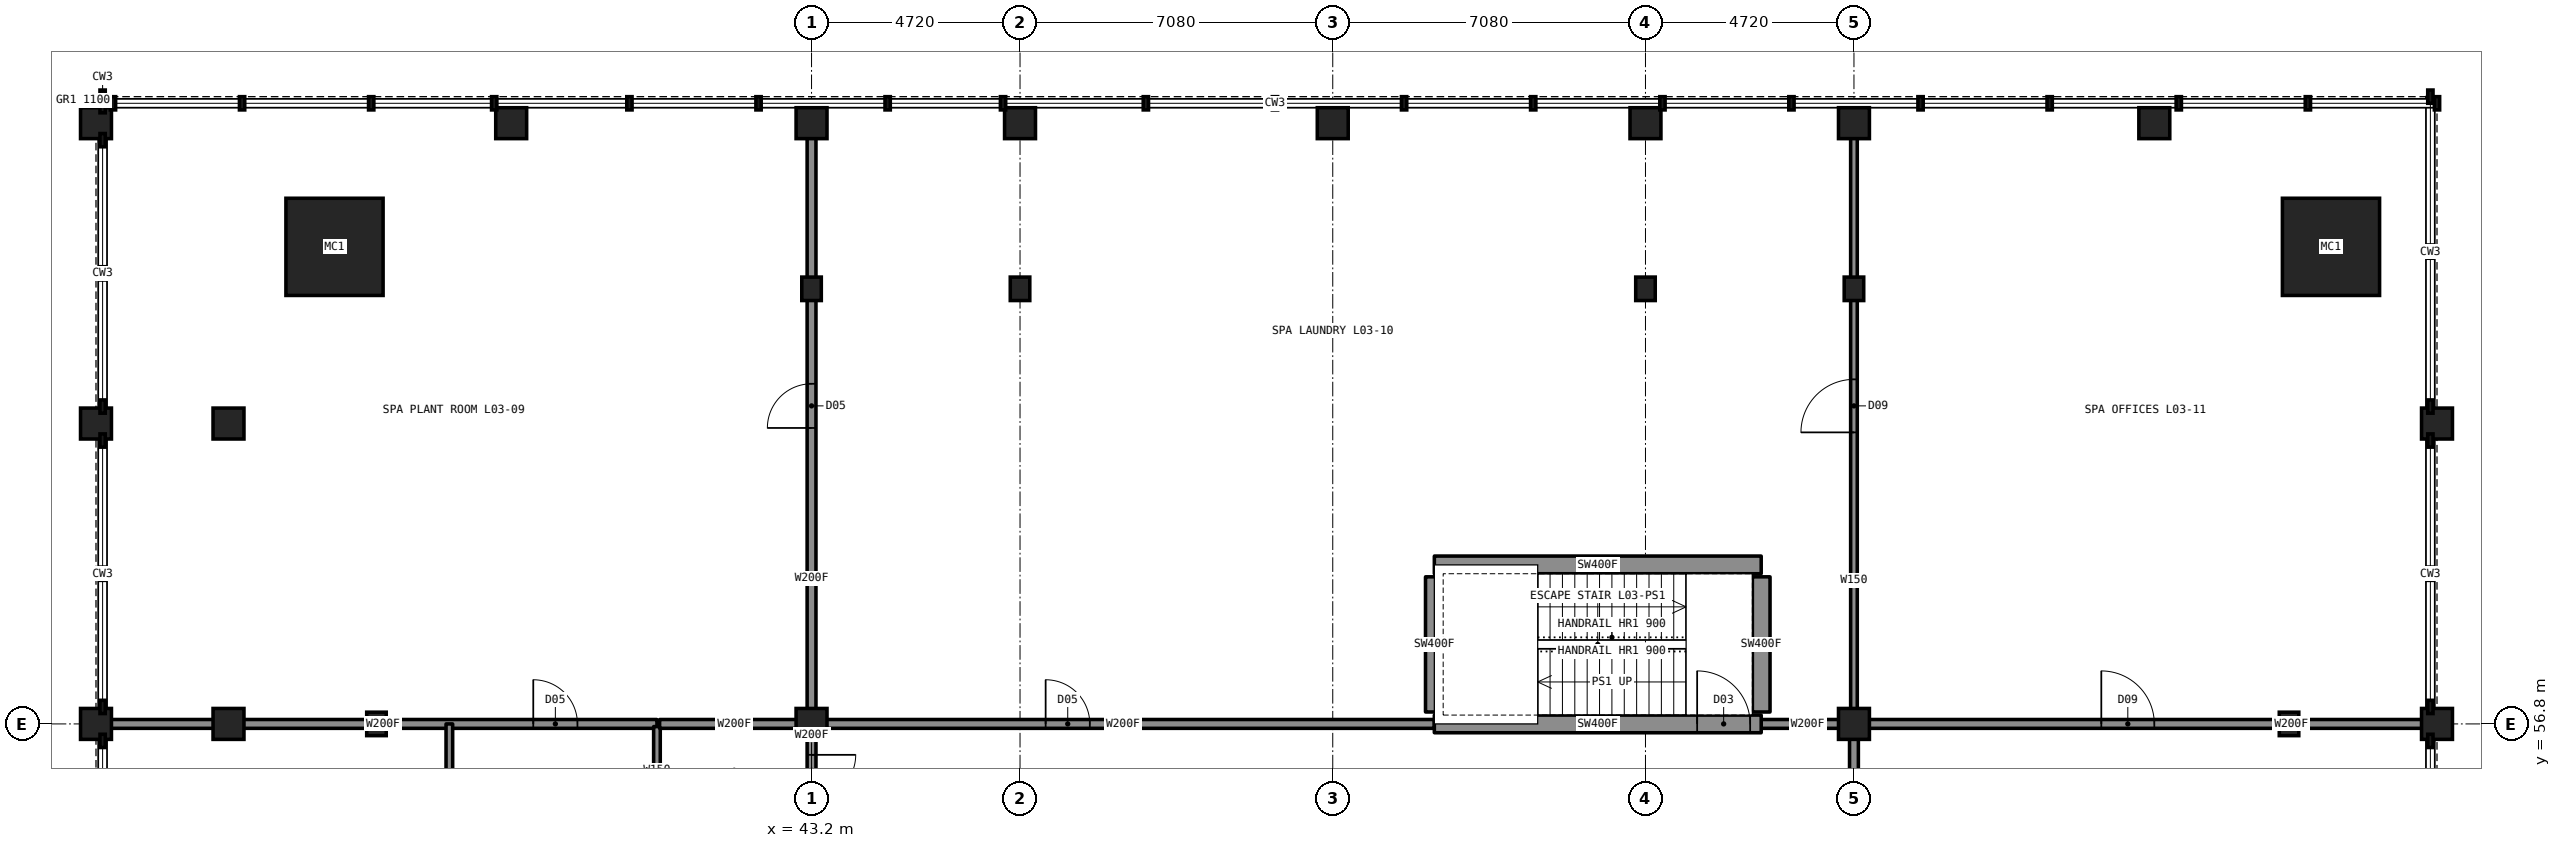
"""IFC4 building model, lengths in metres.
Left out: names, types, materials, properties, quantities, classifications, styles, units other than length and angle.
Written with IfcOpenShell. Run it as: python <this file> out.ifc"""

import sys

from ifc_helpers import new_model, si_unit, direction, frame, frame_2d, origin, origin_2d, place, context, subcontext, project, spatial, rectangle, hollow_rectangle, i_section, extrude, element, fill, save


model = new_model("IFC4")
c1 = context("Model", 3, precision=1e-05, world=origin(), true_north=direction((0.0, 1.0)))
c2 = subcontext(c1, "Body", "Model", "MODEL_VIEW")
j1 = project(units=[si_unit("LENGTHUNIT", "METRE"), si_unit("PLANEANGLEUNIT", "RADIAN")], contexts=[c1])
p1 = place(None, origin())
s1 = spatial("IfcSite", under=j1, at=p1, CompositionType="ELEMENT")
p2 = place(p1, origin())
s2 = spatial("IfcBuilding", under=s1, at=p2, CompositionType="ELEMENT")
p3 = place(p2, frame((0.0, 0.0, 16.0)))
s3 = spatial("IfcBuildingStorey", under=s2, at=p3, CompositionType="ELEMENT", Elevation=16.0)
for number, where, z_axis, x_axis in (
    (1, (33.35, 56.8, 0.0), (0.0, 0.0, 1.0), (1.0, 0.0, 0.0)),
    (2, (43.2, 66.65, 0.0), (0.0, 0.0, 1.0), (1.0, 0.0, 0.0)),
    (3, (47.92, 66.65, 0.0), (0.0, 0.0, 1.0), (1.0, 0.0, 0.0)),
    (4, (62.08, 66.65, 0.0), (0.0, 0.0, 1.0), (1.0, 0.0, 0.0)),
    (5, (66.8, 66.65, 0.0), (0.0, 0.0, 1.0), (1.0, 0.0, 0.0)),
    (6, (76.65, 56.8, 0.0), (0.0, 0.0, 1.0), (1.0, 0.0, 0.0)),
):
    element("IfcColumn", number, at=place(p3, frame(where, z_axis=z_axis, x_axis=x_axis)), inside=s3, PredefinedType="COLUMN", context=c2, shape_type="SweptSolid", body=[
        extrude(i_section(OverallWidth=0.442, OverallDepth=0.531, WebThickness=0.066, FlangeThickness=0.106, at=origin_2d()), origin(), (0.0, 0.0, 1.0), 4.5),
    ])
for number, where, z_axis, x_axis in (
    (7, (43.2, 56.8, 0.0), (0.0, 0.0, 1.0), (1.0, 0.0, 0.0)),
    (8, (66.8, 56.8, 0.0), (0.0, 0.0, 1.0), (1.0, 0.0, 0.0)),
):
    element("IfcColumn", number, at=place(p3, frame(where, z_axis=z_axis, x_axis=x_axis)), inside=s3, PredefinedType="COLUMN", context=c2, shape_type="SweptSolid", body=[
        extrude(hollow_rectangle(XDim=0.7, YDim=0.7, WallThickness=0.06, at=origin_2d()), origin(), (0.0, 0.0, 1.0), 4.5),
    ])
for number, where, z_axis, x_axis in (
    (9, (77.6, 67.6, 0.0), (0.0, 0.0, 1.0), (1.0, 0.0, 0.0)),
    (10, (32.4, 67.6, 0.0), (0.0, 0.0, 1.0), (1.0, 0.0, 0.0)),
):
    element("IfcColumn", number, at=place(p3, frame(where, z_axis=z_axis, x_axis=x_axis)), inside=s3, PredefinedType="COLUMN", context=c2, shape_type="SweptSolid", body=[
        extrude(hollow_rectangle(XDim=2.2, YDim=2.2, WallThickness=0.15, at=origin_2d()), origin(), (0.0, 0.0, 1.0), 4.5),
    ])
for number, where, z_axis, x_axis in (
    (11, (27.0, 56.8, 0.0), (0.0, 0.0, 1.0), (1.0, 0.0, 0.0)),
    (12, (27.0, 63.6, 0.0), (0.0, 0.0, 1.0), (1.0, 0.0, 0.0)),
    (13, (27.0, 70.4, 0.0), (0.0, 0.0, 1.0), (1.0, 0.0, 0.0)),
    (14, (30.0, 56.8, 0.0), (0.0, 0.0, 1.0), (1.0, 0.0, 0.0)),
    (15, (30.0, 63.6, 0.0), (0.0, 0.0, 1.0), (1.0, 0.0, 0.0)),
    (16, (36.4, 70.4, 0.0), (0.0, 0.0, 1.0), (1.0, 0.0, 0.0)),
    (17, (43.2, 70.4, 0.0), (0.0, 0.0, 1.0), (1.0, 0.0, 0.0)),
    (18, (47.92, 70.4, 0.0), (0.0, 0.0, 1.0), (1.0, 0.0, 0.0)),
    (19, (55.0, 70.4, 0.0), (0.0, 0.0, 1.0), (1.0, 0.0, 0.0)),
    (20, (62.08, 70.4, 0.0), (0.0, 0.0, 1.0), (1.0, 0.0, 0.0)),
    (21, (66.8, 70.4, 0.0), (0.0, 0.0, 1.0), (1.0, 0.0, 0.0)),
    (22, (73.6, 70.4, 0.0), (0.0, 0.0, 1.0), (1.0, 0.0, 0.0)),
    (23, (80.0, 56.8, 0.0), (0.0, 0.0, 1.0), (1.0, 0.0, 0.0)),
    (24, (80.0, 63.6, 0.0), (0.0, 0.0, 1.0), (1.0, 0.0, 0.0)),
):
    element("IfcColumn", number, at=place(p3, frame(where, z_axis=z_axis, x_axis=x_axis)), inside=s3, PredefinedType="COLUMN", context=c2, shape_type="SweptSolid", body=[
        extrude(rectangle(XDim=0.7, YDim=0.7, at=origin_2d()), origin(), (0.0, 0.0, 1.0), 4.5),
    ])
p4 = place(p3, frame((43.2, 56.8, 0.0), z_axis=(0.0, 0.0, 1.0), x_axis=(1.0, 0.0, 0.0)))
e25 = element("IfcWall", 25, at=p4, inside=s3, PredefinedType="PARTITIONING", context=c2, shape_type="SweptSolid", body=[
    extrude(rectangle(XDim=14.1, YDim=0.2, at=frame_2d((7.05, 0.0))), origin(), (0.0, 0.0, 1.0), 4.15),
])
p5 = place(p4, frame((5.3, 0.0, 0.0)))
e26 = element("IfcOpeningElement", 26, at=p5, cuts=e25, PredefinedType="OPENING", context=c2, shape_type="SweptSolid", body=[
    extrude(rectangle(XDim=1.0, YDim=2.1, at=frame_2d((0.5, 1.05))), frame((0.0, 0.11, 0.0), z_axis=(0.0, -1.0, 0.0), x_axis=(1.0, 0.0, 0.0)), (0.0, 0.0, 1.0), 0.22),
])
p6 = place(p3, frame((64.7, 56.8, 0.0), z_axis=(0.0, 0.0, 1.0), x_axis=(1.0, 0.0, 0.0)))
e27 = element("IfcWall", 27, at=p6, inside=s3, PredefinedType="PARTITIONING", context=c2, shape_type="SweptSolid", body=[
    extrude(rectangle(XDim=2.1, YDim=0.2, at=frame_2d((1.05, 0.0))), origin(), (0.0, 0.0, 1.0), 4.15),
])
p7 = place(p3, frame((27.3, 56.8, 0.0), z_axis=(0.0, 0.0, 1.0), x_axis=(1.0, 0.0, 0.0)))
e28 = element("IfcWall", 28, at=p7, inside=s3, PredefinedType="PARTITIONING", context=c2, shape_type="SweptSolid", body=[
    extrude(rectangle(XDim=12.4, YDim=0.2, at=frame_2d((6.2, 0.0))), origin(), (0.0, 0.0, 1.0), 4.15),
])
p8 = place(p7, frame((9.6, 0.0, 0.0)))
e29 = element("IfcOpeningElement", 29, at=p8, cuts=e28, PredefinedType="OPENING", context=c2, shape_type="SweptSolid", body=[
    extrude(rectangle(XDim=1.0, YDim=2.1, at=frame_2d((0.5, 1.05))), frame((0.0, 0.11, 0.0), z_axis=(0.0, -1.0, 0.0), x_axis=(1.0, 0.0, 0.0)), (0.0, 0.0, 1.0), 0.22),
])
p9 = place(p3, frame((66.8, 56.8, 0.0), z_axis=(0.0, 0.0, 1.0), x_axis=(1.0, 0.0, 0.0)))
e30 = element("IfcWall", 30, at=p9, inside=s3, PredefinedType="PARTITIONING", context=c2, shape_type="SweptSolid", body=[
    extrude(rectangle(XDim=12.9, YDim=0.2, at=frame_2d((6.45, 0.0))), origin(), (0.0, 0.0, 1.0), 4.15),
])
p10 = place(p9, frame((5.6, 0.0, 0.0)))
e31 = element("IfcOpeningElement", 31, at=p10, cuts=e30, PredefinedType="OPENING", context=c2, shape_type="SweptSolid", body=[
    extrude(rectangle(XDim=1.2, YDim=2.2, at=frame_2d((0.6, 1.1))), frame((0.0, 0.11, 0.0), z_axis=(0.0, -1.0, 0.0), x_axis=(1.0, 0.0, 0.0)), (0.0, 0.0, 1.0), 0.22),
])
p11 = place(p3, frame((57.3, 56.8, 0.0), z_axis=(0.0, 0.0, 1.0), x_axis=(1.0, 0.0, 0.0)))
e32 = element("IfcWall", 32, at=p11, inside=s3, PredefinedType="SHEAR", context=c2, shape_type="SweptSolid", body=[
    extrude(rectangle(XDim=7.4, YDim=0.4, at=frame_2d((3.7, 0.0))), origin(), (0.0, 0.0, 1.0), 4.5),
])
p12 = place(p11, frame((5.95, 0.0, 0.0)))
e33 = element("IfcOpeningElement", 33, at=p12, cuts=e32, PredefinedType="OPENING", context=c2, shape_type="SweptSolid", body=[
    extrude(rectangle(XDim=1.2, YDim=2.2, at=frame_2d((0.6, 1.1))), frame((0.0, 0.21, 0.0), z_axis=(0.0, -1.0, 0.0), x_axis=(1.0, 0.0, 0.0)), (0.0, 0.0, 1.0), 0.42),
])
p13 = place(p3, frame((57.3, 60.4, 0.0), z_axis=(0.0, 0.0, 1.0), x_axis=(1.0, 0.0, 0.0)))
e34 = element("IfcWall", 34, at=p13, inside=s3, PredefinedType="SHEAR", context=c2, shape_type="SweptSolid", body=[
    extrude(rectangle(XDim=7.4, YDim=0.4, at=frame_2d((3.7, 0.0))), origin(), (0.0, 0.0, 1.0), 4.5),
])
p14 = place(p3, frame((43.2, 56.8, 0.0), z_axis=(0.0, 0.0, 1.0), x_axis=(0.0, 1.0, 0.0)))
e35 = element("IfcWall", 35, at=p14, inside=s3, PredefinedType="PARTITIONING", context=c2, shape_type="SweptSolid", body=[
    extrude(rectangle(XDim=13.9, YDim=0.2, at=frame_2d((6.95, 0.0))), origin(), (0.0, 0.0, 1.0), 4.15),
])
p15 = place(p14, frame((6.7, 0.0, 0.0)))
e36 = element("IfcOpeningElement", 36, at=p15, cuts=e35, PredefinedType="OPENING", context=c2, shape_type="SweptSolid", body=[
    extrude(rectangle(XDim=1.0, YDim=2.1, at=frame_2d((0.5, 1.05))), frame((0.0, 0.11, 0.0), z_axis=(0.0, -1.0, 0.0), x_axis=(1.0, 0.0, 0.0)), (0.0, 0.0, 1.0), 0.22),
])
p16 = place(p3, frame((35.0, 33.2, 0.0), z_axis=(0.0, 0.0, 1.0), x_axis=(0.0, 1.0, 0.0)))
e37 = element("IfcWall", 37, at=p16, inside=s3, PredefinedType="PARTITIONING", context=c2, shape_type="SweptSolid", body=[
    extrude(rectangle(XDim=23.6, YDim=0.15, at=frame_2d((11.8, 0.0))), origin(), (0.0, 0.0, 1.0), 4.15),
])
p17 = place(p3, frame((66.8, 42.7, 0.0), z_axis=(0.0, 0.0, 1.0), x_axis=(0.0, 1.0, 0.0)))
e38 = element("IfcWall", 38, at=p17, inside=s3, PredefinedType="PARTITIONING", context=c2, shape_type="SweptSolid", body=[
    extrude(rectangle(XDim=14.1, YDim=0.2, at=frame_2d((7.05, 0.0))), origin(), (0.0, 0.0, 1.0), 4.15),
])
p18 = place(p17, frame((8.8, 0.0, 0.0)))
e39 = element("IfcOpeningElement", 39, at=p18, cuts=e38, PredefinedType="OPENING", context=c2, shape_type="SweptSolid", body=[
    extrude(rectangle(XDim=1.0, YDim=2.1, at=frame_2d((0.5, 1.05))), frame((0.0, 0.11, 0.0), z_axis=(0.0, -1.0, 0.0), x_axis=(1.0, 0.0, 0.0)), (0.0, 0.0, 1.0), 0.22),
])
p19 = place(p3, frame((66.8, 56.8, 0.0), z_axis=(0.0, 0.0, 1.0), x_axis=(0.0, 1.0, 0.0)))
e40 = element("IfcWall", 40, at=p19, inside=s3, PredefinedType="PARTITIONING", context=c2, shape_type="SweptSolid", body=[
    extrude(rectangle(XDim=13.9, YDim=0.15, at=frame_2d((6.95, 0.0))), origin(), (0.0, 0.0, 1.0), 4.15),
])
p20 = place(p19, frame((6.6, 0.0, 0.0)))
e41 = element("IfcOpeningElement", 41, at=p20, cuts=e40, PredefinedType="OPENING", context=c2, shape_type="SweptSolid", body=[
    extrude(rectangle(XDim=1.2, YDim=2.2, at=frame_2d((0.6, 1.1))), frame((0.0, 0.085, 0.0), z_axis=(0.0, -1.0, 0.0), x_axis=(1.0, 0.0, 0.0)), (0.0, 0.0, 1.0), 0.17),
])
for number, where, z_axis, x_axis in (
    (42, (57.3, 57.07, 0.0), (0.0, 0.0, 1.0), (0.0, 1.0, 0.0)),
    (43, (64.7, 57.07, 0.0), (0.0, 0.0, 1.0), (0.0, 1.0, 0.0)),
):
    element("IfcWall", number, at=place(p3, frame(where, z_axis=z_axis, x_axis=x_axis)), inside=s3, PredefinedType="SHEAR", context=c2, shape_type="SweptSolid", body=[
        extrude(rectangle(XDim=3.06, YDim=0.4, at=frame_2d((1.53, 0.0))), origin(), (0.0, 0.0, 1.0), 4.5),
    ])
p21 = place(p3, frame((43.2, 56.74, 0.0), z_axis=(0.0, 0.0, 1.0), x_axis=(0.0, -1.0, 0.0)))
e44 = element("IfcWall", 44, at=p21, inside=s3, PredefinedType="PARTITIONING", context=c2, shape_type="SweptSolid", body=[
    extrude(rectangle(XDim=1.98, YDim=0.2, at=frame_2d((0.99, 0.0))), origin(), (0.0, 0.0, 1.0), 4.15),
])
p22 = place(p21, frame((0.64, 0.0, 0.0)))
e45 = element("IfcOpeningElement", 45, at=p22, cuts=e44, PredefinedType="OPENING", context=c2, shape_type="SweptSolid", body=[
    extrude(rectangle(XDim=1.0, YDim=2.1, at=frame_2d((0.5, 1.05))), frame((0.0, 0.11, 0.0), z_axis=(0.0, -1.0, 0.0), x_axis=(1.0, 0.0, 0.0)), (0.0, 0.0, 1.0), 0.22),
])
p23 = place(p3, frame((39.7, 54.76, 0.0), z_axis=(0.0, 0.0, 1.0), x_axis=(0.0, 1.0, 0.0)))
e46 = element("IfcWall", 46, at=p23, inside=s3, PredefinedType="PARTITIONING", context=c2, shape_type="SweptSolid", body=[
    extrude(rectangle(XDim=1.98, YDim=0.15, at=frame_2d((0.99, 0.0))), origin(), (0.0, 0.0, 1.0), 4.15),
])
p24 = place(p3, frame((39.76, 56.8, 0.0), z_axis=(0.0, 0.0, 1.0), x_axis=(1.0, 0.0, 0.0)))
e47 = element("IfcWall", 47, at=p24, inside=s3, PredefinedType="PARTITIONING", context=c2, shape_type="SweptSolid", body=[
    extrude(rectangle(XDim=3.38, YDim=0.2, at=frame_2d((1.69, 0.0))), origin(), (0.0, 0.0, 1.0), 4.15),
])
p25 = place(p12, origin())
e48 = element("IfcDoor", 48, at=p25, inside=s3, OperationType="SINGLE_SWING_LEFT", PredefinedType="DOOR", context=c2, shape_type="SweptSolid", body=[
    extrude(rectangle(XDim=1.2, YDim=2.2, at=frame_2d((0.6, 1.1))), frame((0.0, 0.025, 0.0), z_axis=(0.0, -1.0, 0.0), x_axis=(1.0, 0.0, 0.0)), (0.0, 0.0, 1.0), 0.05),
])
fill(e33, e48)
p26 = place(p8, origin())
e49 = element("IfcDoor", 49, at=p26, inside=s3, OperationType="SINGLE_SWING_LEFT", PredefinedType="DOOR", context=c2, shape_type="SweptSolid", body=[
    extrude(rectangle(XDim=1.0, YDim=2.1, at=frame_2d((0.5, 1.05))), frame((0.0, 0.025, 0.0), z_axis=(0.0, -1.0, 0.0), x_axis=(1.0, 0.0, 0.0)), (0.0, 0.0, 1.0), 0.05),
])
fill(e29, e49)
p27 = place(p15, origin())
e50 = element("IfcDoor", 50, at=p27, inside=s3, OperationType="SINGLE_SWING_LEFT", PredefinedType="DOOR", context=c2, shape_type="SweptSolid", body=[
    extrude(rectangle(XDim=1.0, YDim=2.1, at=frame_2d((0.5, 1.05))), frame((0.0, 0.025, 0.0), z_axis=(0.0, -1.0, 0.0), x_axis=(1.0, 0.0, 0.0)), (0.0, 0.0, 1.0), 0.05),
])
fill(e36, e50)
p28 = place(p5, origin())
e51 = element("IfcDoor", 51, at=p28, inside=s3, OperationType="SINGLE_SWING_LEFT", PredefinedType="DOOR", context=c2, shape_type="SweptSolid", body=[
    extrude(rectangle(XDim=1.0, YDim=2.1, at=frame_2d((0.5, 1.05))), frame((0.0, 0.025, 0.0), z_axis=(0.0, -1.0, 0.0), x_axis=(1.0, 0.0, 0.0)), (0.0, 0.0, 1.0), 0.05),
])
fill(e26, e51)
p29 = place(p20, origin())
e52 = element("IfcDoor", 52, at=p29, inside=s3, OperationType="SINGLE_SWING_LEFT", PredefinedType="DOOR", context=c2, shape_type="SweptSolid", body=[
    extrude(rectangle(XDim=1.2, YDim=2.2, at=frame_2d((0.6, 1.1))), frame((0.0, 0.025, 0.0), z_axis=(0.0, -1.0, 0.0), x_axis=(1.0, 0.0, 0.0)), (0.0, 0.0, 1.0), 0.05),
])
fill(e41, e52)
p30 = place(p10, origin())
e53 = element("IfcDoor", 53, at=p30, inside=s3, OperationType="SINGLE_SWING_LEFT", PredefinedType="DOOR", context=c2, shape_type="SweptSolid", body=[
    extrude(rectangle(XDim=1.2, YDim=2.2, at=frame_2d((0.6, 1.1))), frame((0.0, 0.025, 0.0), z_axis=(0.0, -1.0, 0.0), x_axis=(1.0, 0.0, 0.0)), (0.0, 0.0, 1.0), 0.05),
])
fill(e31, e53)
p31 = place(p22, origin())
e54 = element("IfcDoor", 54, at=p31, inside=s3, OperationType="SINGLE_SWING_LEFT", PredefinedType="DOOR", context=c2, shape_type="SweptSolid", body=[
    extrude(rectangle(XDim=1.0, YDim=2.1, at=frame_2d((0.5, 1.05))), frame((0.0, 0.025, 0.0), z_axis=(0.0, -1.0, 0.0), x_axis=(1.0, 0.0, 0.0)), (0.0, 0.0, 1.0), 0.05),
])
fill(e45, e54)
save(model, sys.argv[1])
